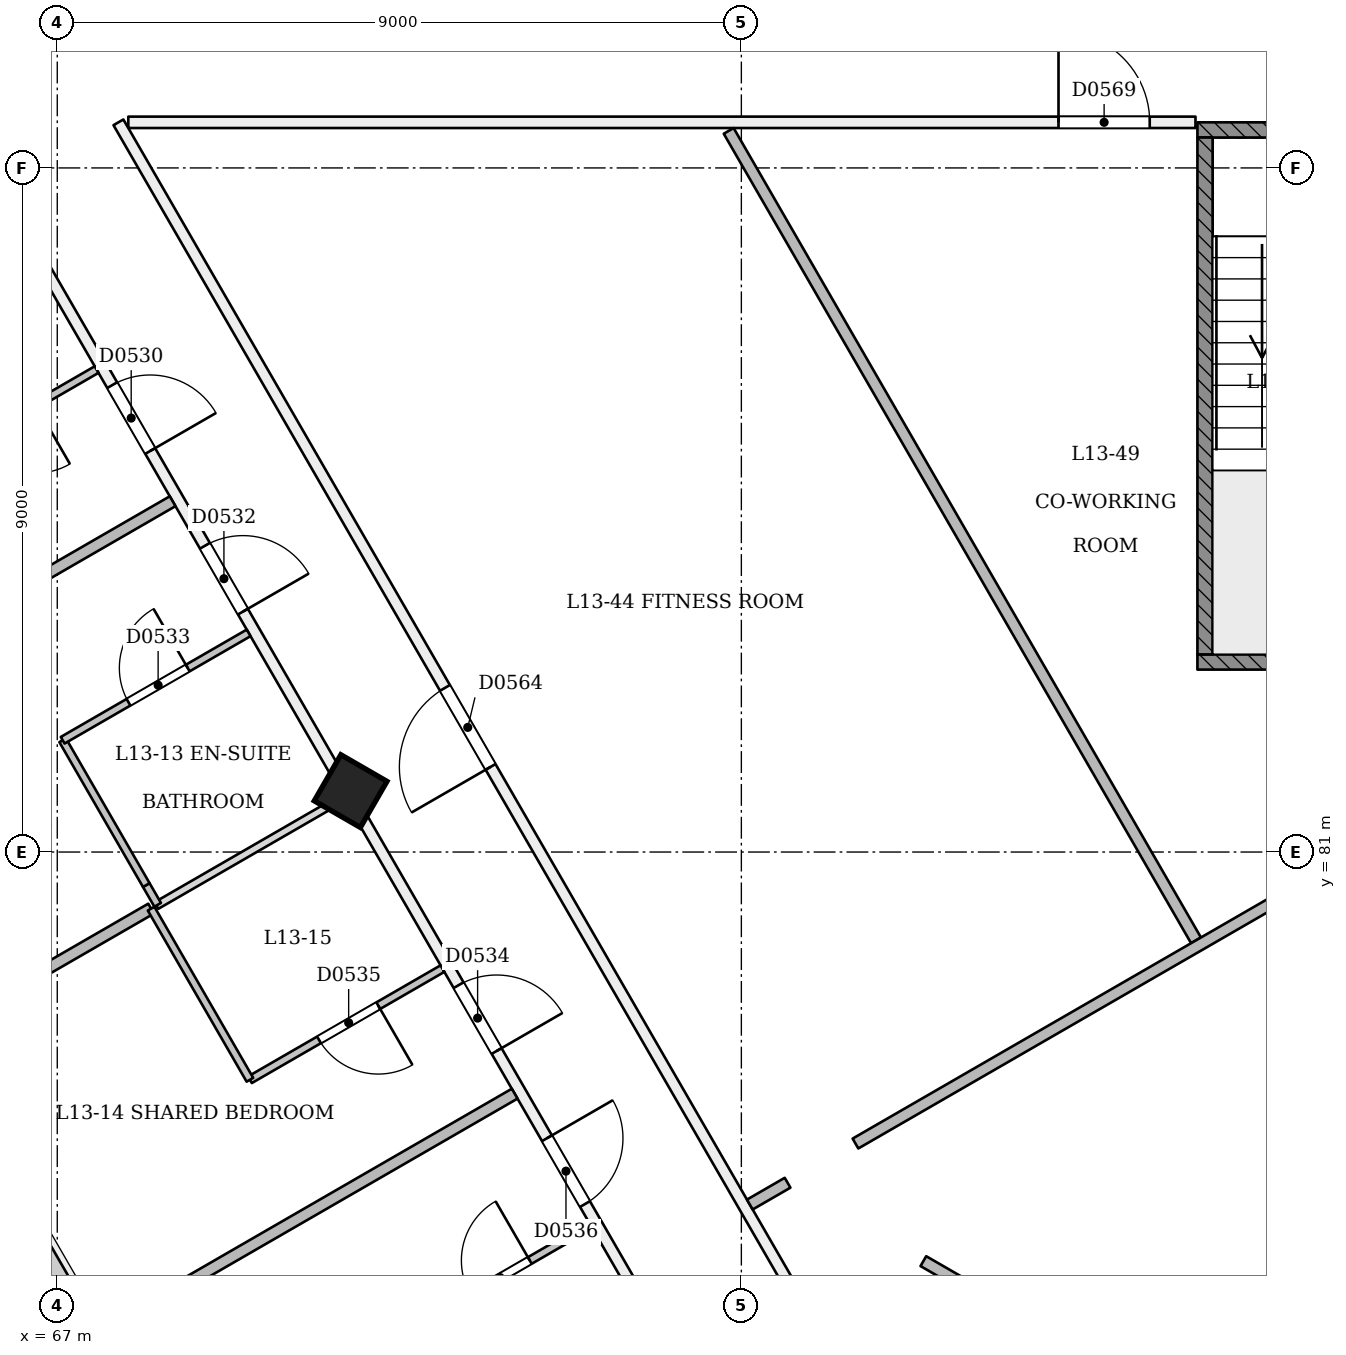
"""IFC4 building model, lengths in metres.
Left out: names, types, materials, properties, quantities, classifications, styles, units other than length and angle.
Written with IfcOpenShell. Run it as: python <this file> out.ifc"""

import sys

from ifc_helpers import new_model, si_unit, direction, frame, frame_2d, origin, origin_2d, place, context, subcontext, project, spatial, rectangle, extrude, element, fill, save


model = new_model("IFC4")
c1 = context("Model", 3, precision=1e-05, world=origin(), true_north=direction((0.0, 1.0)))
c2 = subcontext(c1, "Body", "Model", "MODEL_VIEW")
j1 = project(units=[si_unit("LENGTHUNIT", "METRE"), si_unit("PLANEANGLEUNIT", "RADIAN")], contexts=[c1])
p1 = place(None, origin())
s1 = spatial("IfcSite", under=j1, at=p1, CompositionType="ELEMENT")
p2 = place(p1, origin())
s2 = spatial("IfcBuilding", under=s1, at=p2, CompositionType="ELEMENT")
p3 = place(p2, frame((0.0, 0.0, 55.8)))
s3 = spatial("IfcBuildingStorey", under=s2, at=p3, CompositionType="ELEMENT", Elevation=55.8)
p4 = place(p3, frame((70.832, 81.755, -0.021), z_axis=(0.022222852987, 0.038483477124, 0.999012095419), x_axis=(-0.86564204084, -0.499182068467, 0.038485317347)))
e1 = element("IfcColumn", 1, at=p4, inside=s3, PredefinedType="COLUMN", context=c2, shape_type="SweptSolid", body=[
    extrude(rectangle(XDim=0.7, YDim=0.7, at=origin_2d()), origin(), (0.0, 0.0, 1.0), 3.604),
])
p5 = place(p3, frame((64.083, 93.447, 0.0), z_axis=(0.0, 0.0, 1.0), x_axis=(0.5000018851, -0.866024315419, 0.0)))
e2 = element("IfcWall", 2, at=p5, inside=s3, PredefinedType="PARTITIONING", context=c2, shape_type="SweptSolid", body=[
    extrude(rectangle(XDim=36.0, YDim=0.15, at=frame_2d((18.0, 0.0))), origin(), (0.0, 0.0, 1.0), 2.7),
])
p6 = place(p5, frame((0.605, 0.0, 0.0)))
e3 = element("IfcOpeningElement", 3, at=p6, cuts=e2, PredefinedType="OPENING", context=c2, shape_type="SweptSolid", body=[
    extrude(rectangle(XDim=1.0, YDim=2.1, at=frame_2d((0.5, 1.05))), frame((0.0, 0.085, 0.0), z_axis=(0.0, -1.0, 0.0), x_axis=(1.0, 0.0, 0.0)), (0.0, 0.0, 1.0), 0.171),
])
p7 = place(p5, frame((7.28, 0.0, 0.0)))
e4 = element("IfcOpeningElement", 4, at=p7, cuts=e2, PredefinedType="OPENING", context=c2, shape_type="SweptSolid", body=[
    extrude(rectangle(XDim=1.0, YDim=2.1, at=frame_2d((0.5, 1.05))), frame((0.0, 0.085, 0.0), z_axis=(0.0, -1.0, 0.0), x_axis=(1.0, 0.0, 0.0)), (0.0, 0.0, 1.0), 0.171),
])
p8 = place(p5, frame((9.72, 0.0, 0.0)))
e5 = element("IfcOpeningElement", 5, at=p8, cuts=e2, PredefinedType="OPENING", context=c2, shape_type="SweptSolid", body=[
    extrude(rectangle(XDim=1.0, YDim=2.1, at=frame_2d((0.5, 1.05))), frame((0.0, 0.085, 0.0), z_axis=(0.0, -1.0, 0.0), x_axis=(1.0, 0.0, 0.0)), (0.0, 0.0, 1.0), 0.171),
])
p9 = place(p5, frame((16.395, 0.0, 0.0)))
e6 = element("IfcOpeningElement", 6, at=p9, cuts=e2, PredefinedType="OPENING", context=c2, shape_type="SweptSolid", body=[
    extrude(rectangle(XDim=1.0, YDim=2.1, at=frame_2d((0.5, 1.05))), frame((0.0, 0.085, 0.0), z_axis=(0.0, -1.0, 0.0), x_axis=(1.0, 0.0, 0.0)), (0.0, 0.0, 1.0), 0.171),
])
p10 = place(p5, frame((18.72, 0.0, 0.0)))
e7 = element("IfcOpeningElement", 7, at=p10, cuts=e2, PredefinedType="OPENING", context=c2, shape_type="SweptSolid", body=[
    extrude(rectangle(XDim=1.0, YDim=2.1, at=frame_2d((0.5, 1.05))), frame((0.0, 0.085, 0.0), z_axis=(0.0, -1.0, 0.0), x_axis=(1.0, 0.0, 0.0)), (0.0, 0.0, 1.0), 0.171),
])
p11 = place(p5, frame((25.395, 0.0, 0.0)))
e8 = element("IfcOpeningElement", 8, at=p11, cuts=e2, PredefinedType="OPENING", context=c2, shape_type="SweptSolid", body=[
    extrude(rectangle(XDim=1.0, YDim=2.1, at=frame_2d((0.5, 1.05))), frame((0.0, 0.085, 0.0), z_axis=(0.0, -1.0, 0.0), x_axis=(1.0, 0.0, 0.0)), (0.0, 0.0, 1.0), 0.171),
])
p12 = place(p5, frame((27.605, 0.0, 0.0)))
e9 = element("IfcOpeningElement", 9, at=p12, cuts=e2, PredefinedType="OPENING", context=c2, shape_type="SweptSolid", body=[
    extrude(rectangle(XDim=1.0, YDim=2.1, at=frame_2d((0.5, 1.05))), frame((0.0, 0.085, 0.0), z_axis=(0.0, -1.0, 0.0), x_axis=(1.0, 0.0, 0.0)), (0.0, 0.0, 1.0), 0.171),
])
p13 = place(p5, frame((34.28, 0.0, 0.0)))
e10 = element("IfcOpeningElement", 10, at=p13, cuts=e2, PredefinedType="OPENING", context=c2, shape_type="SweptSolid", body=[
    extrude(rectangle(XDim=1.0, YDim=2.1, at=frame_2d((0.5, 1.05))), frame((0.0, 0.085, 0.0), z_axis=(0.0, -1.0, 0.0), x_axis=(1.0, 0.0, 0.0)), (0.0, 0.0, 1.0), 0.171),
])
p14 = place(p3, frame((67.935, 90.6, 0.0), z_axis=(0.0, 0.0, 1.0), x_axis=(1.0, 0.0, 0.0)))
e11 = element("IfcWall", 11, at=p14, inside=s3, PredefinedType="PARTITIONING", context=c2, shape_type="SweptSolid", body=[
    extrude(rectangle(XDim=14.04, YDim=0.15, at=frame_2d((7.02, 0.0))), origin(), (0.0, 0.0, 1.0), 3.1),
])
p15 = place(p14, frame((12.238, 0.0, 0.0)))
e12 = element("IfcOpeningElement", 12, at=p15, cuts=e11, PredefinedType="OPENING", context=c2, shape_type="SweptSolid", body=[
    extrude(rectangle(XDim=1.2, YDim=2.1, at=frame_2d((0.6, 1.05))), frame((0.0, 0.085, 0.0), z_axis=(0.0, -1.0, 0.0), x_axis=(1.0, 0.0, 0.0)), (0.0, 0.0, 1.0), 0.171),
])
p16 = place(p3, frame((85.0, 60.817, 0.0), z_axis=(0.0, 0.0, 1.0), x_axis=(-0.49999631887, 0.866027529076, 0.0)))
e13 = element("IfcWall", 13, at=p16, inside=s3, PredefinedType="PARTITIONING", context=c2, shape_type="SweptSolid", body=[
    extrude(rectangle(XDim=34.391, YDim=0.15, at=frame_2d((17.195, 0.0))), origin(), (0.0, 0.0, 1.0), 3.1),
])
p17 = place(p16, frame((24.599, 0.0, 0.0)))
e14 = element("IfcOpeningElement", 14, at=p17, cuts=e13, PredefinedType="OPENING", context=c2, shape_type="SweptSolid", body=[
    extrude(rectangle(XDim=1.2, YDim=2.1, at=frame_2d((0.6, 1.05))), frame((0.0, 0.085, 0.0), z_axis=(0.0, -1.0, 0.0), x_axis=(1.0, 0.0, 0.0)), (0.0, 0.0, 1.0), 0.171),
])
p18 = place(p16, frame((7.281, 0.0, 0.0)))
e15 = element("IfcOpeningElement", 15, at=p18, cuts=e13, PredefinedType="OPENING", context=c2, shape_type="SweptSolid", body=[
    extrude(rectangle(XDim=1.2, YDim=2.1, at=frame_2d((0.6, 1.05))), frame((0.0, 0.085, 0.0), z_axis=(0.0, -1.0, 0.0), x_axis=(1.0, 0.0, 0.0)), (0.0, 0.0, 1.0), 0.171),
])
p19 = place(p3, frame((67.518, 87.347, 0.0), z_axis=(0.0, 0.0, 1.0), x_axis=(-0.866011447264, -0.500024172624, 0.0)))
e16 = element("IfcWall", 16, at=p19, inside=s3, PredefinedType="PARTITIONING", context=c2, shape_type="SweptSolid", body=[
    extrude(rectangle(XDim=2.825, YDim=0.1, at=frame_2d((1.413, 0.0))), origin(), (0.0, 0.0, 1.0), 3.1),
])
p20 = place(p19, frame((0.925, 0.0, 0.0)))
e17 = element("IfcOpeningElement", 17, at=p20, cuts=e16, PredefinedType="OPENING", context=c2, shape_type="SweptSolid", body=[
    extrude(rectangle(XDim=0.9, YDim=2.1, at=frame_2d((0.45, 1.05))), frame((0.0, 0.061, 0.0), z_axis=(0.0, -1.0, 0.0), x_axis=(1.0, 0.0, 0.0)), (0.0, 0.0, 1.0), 0.121),
])
p21 = place(p3, frame((63.022, 82.442, 0.0), z_axis=(0.0, 0.0, 1.0), x_axis=(0.866025401434, 0.500000004071, 0.0)))
e18 = element("IfcWall", 18, at=p21, inside=s3, PredefinedType="PARTITIONING", context=c2, shape_type="SweptSolid", body=[
    extrude(rectangle(XDim=6.345, YDim=0.15, at=frame_2d((3.173, 0.0))), origin(), (0.0, 0.0, 1.0), 2.6),
])
p22 = place(p3, frame((68.321, 80.305, 0.0), z_axis=(0.0, 0.0, 1.0), x_axis=(-0.499816412211, 0.866131372301, 0.0)))
e19 = element("IfcWall", 19, at=p22, inside=s3, PredefinedType="PARTITIONING", context=c2, shape_type="SweptSolid", body=[
    extrude(rectangle(XDim=0.3, YDim=0.1, at=frame_2d((0.15, 0.0))), origin(), (0.0, 0.0, 1.0), 2.7),
])
p23 = place(p3, frame((68.171, 80.565, 0.0), z_axis=(0.0, 0.0, 1.0), x_axis=(-0.50002983664, 0.866008176907, 0.0)))
e20 = element("IfcWall", 20, at=p23, inside=s3, PredefinedType="PARTITIONING", context=c2, shape_type="SweptSolid", body=[
    extrude(rectangle(XDim=2.2, YDim=0.1, at=frame_2d((1.1, 0.0))), origin(), (0.0, 0.0, 1.0), 3.1),
])
p24 = place(p3, frame((67.071, 82.47, 0.0), z_axis=(0.0, 0.0, 1.0), x_axis=(0.866011447264, 0.500024172624, 0.0)))
e21 = element("IfcWall", 21, at=p24, inside=s3, PredefinedType="PARTITIONING", context=c2, shape_type="SweptSolid", body=[
    extrude(rectangle(XDim=2.825, YDim=0.1, at=frame_2d((1.413, 0.0))), origin(), (0.0, 0.0, 1.0), 3.1),
])
p25 = place(p24, frame((1.0, 0.0, 0.0)))
e22 = element("IfcOpeningElement", 22, at=p25, cuts=e21, PredefinedType="OPENING", context=c2, shape_type="SweptSolid", body=[
    extrude(rectangle(XDim=0.9, YDim=2.1, at=frame_2d((0.45, 1.05))), frame((0.0, 0.061, 0.0), z_axis=(0.0, -1.0, 0.0), x_axis=(1.0, 0.0, 0.0)), (0.0, 0.0, 1.0), 0.121),
])
p26 = place(p3, frame((65.29, 78.555, 0.0), z_axis=(0.0, 0.0, 1.0), x_axis=(0.866020560687, 0.500008388397, 0.0)))
e23 = element("IfcWall", 23, at=p26, inside=s3, PredefinedType="PARTITIONING", context=c2, shape_type="SweptSolid", body=[
    extrude(rectangle(XDim=3.4, YDim=0.15, at=frame_2d((1.7, 0.0))), origin(), (0.0, 0.0, 1.0), 2.6),
])
p27 = place(p3, frame((68.304, 80.295, 0.0), z_axis=(0.0, 0.0, 1.0), x_axis=(0.866011243319, 0.500024525844, 0.0)))
e24 = element("IfcWall", 24, at=p27, inside=s3, PredefinedType="PARTITIONING", context=c2, shape_type="SweptSolid", body=[
    extrude(rectangle(XDim=2.845, YDim=0.1, at=frame_2d((1.422, 0.0))), origin(), (0.0, 0.0, 1.0), 2.7),
])
p28 = place(p3, frame((72.068, 79.466, 0.0), z_axis=(0.0, 0.0, 1.0), x_axis=(-0.866046596414, -0.499963291492, 0.0)))
e25 = element("IfcWall", 25, at=p28, inside=s3, PredefinedType="PARTITIONING", context=c2, shape_type="SweptSolid", body=[
    extrude(rectangle(XDim=2.925, YDim=0.1, at=frame_2d((1.462, 0.0))), origin(), (0.0, 0.0, 1.0), 3.1),
])
p29 = place(p28, frame((0.975, 0.0, 0.0)))
e26 = element("IfcOpeningElement", 26, at=p29, cuts=e25, PredefinedType="OPENING", context=c2, shape_type="SweptSolid", body=[
    extrude(rectangle(XDim=0.9, YDim=2.1, at=frame_2d((0.45, 1.05))), frame((0.0, 0.061, 0.0), z_axis=(0.0, -1.0, 0.0), x_axis=(1.0, 0.0, 0.0)), (0.0, 0.0, 1.0), 0.121),
])
p30 = place(p3, frame((69.534, 78.004, 0.0), z_axis=(0.0, 0.0, 1.0), x_axis=(-0.500047596559, 0.865997922154, 0.0)))
e27 = element("IfcWall", 27, at=p30, inside=s3, PredefinedType="PARTITIONING", context=c2, shape_type="SweptSolid", body=[
    extrude(rectangle(XDim=2.6, YDim=0.1, at=frame_2d((1.3, 0.0))), origin(), (0.0, 0.0, 1.0), 2.7),
])
p31 = place(p3, frame((67.522, 74.648, 0.0), z_axis=(0.0, 0.0, 1.0), x_axis=(0.866025401434, 0.500000004071, 0.0)))
e28 = element("IfcWall", 28, at=p31, inside=s3, PredefinedType="PARTITIONING", context=c2, shape_type="SweptSolid", body=[
    extrude(rectangle(XDim=6.345, YDim=0.15, at=frame_2d((3.173, 0.0))), origin(), (0.0, 0.0, 1.0), 2.6),
])
p32 = place(p3, frame((71.571, 74.676, 0.0), z_axis=(0.0, 0.0, 1.0), x_axis=(0.866011447264, 0.500024172624, 0.0)))
e29 = element("IfcWall", 29, at=p32, inside=s3, PredefinedType="PARTITIONING", context=c2, shape_type="SweptSolid", body=[
    extrude(rectangle(XDim=2.825, YDim=0.1, at=frame_2d((1.413, 0.0))), origin(), (0.0, 0.0, 1.0), 3.1),
])
p33 = place(p32, frame((1.0, 0.0, 0.0)))
e30 = element("IfcOpeningElement", 30, at=p33, cuts=e29, PredefinedType="OPENING", context=c2, shape_type="SweptSolid", body=[
    extrude(rectangle(XDim=0.9, YDim=2.1, at=frame_2d((0.45, 1.05))), frame((0.0, 0.061, 0.0), z_axis=(0.0, -1.0, 0.0), x_axis=(1.0, 0.0, 0.0)), (0.0, 0.0, 1.0), 0.121),
])
p34 = place(p3, frame((78.395, 75.618, 0.0), z_axis=(0.0, 0.0, 1.0), x_axis=(0.866027097721, -0.499997066004, 0.0)))
e31 = element("IfcWall", 31, at=p34, inside=s3, PredefinedType="PARTITIONING", context=c2, shape_type="SweptSolid", body=[
    extrude(rectangle(XDim=11.441, YDim=0.15, at=frame_2d((5.72, 0.0))), origin(), (0.0, 0.0, 1.0), 3.1),
])
p35 = place(p3, frame((76.111, 76.363, 0.0), z_axis=(0.0, 0.0, 1.0), x_axis=(0.866192672213, 0.499710170603, 0.0)))
e32 = element("IfcWall", 32, at=p35, inside=s3, PredefinedType="PARTITIONING", context=c2, shape_type="SweptSolid", body=[
    extrude(rectangle(XDim=0.573, YDim=0.15, at=frame_2d((0.287, 0.0))), origin(), (0.0, 0.0, 1.0), 3.1),
])
p36 = place(p3, frame((81.982, 79.838, 0.0), z_axis=(0.0, 0.0, 1.0), x_axis=(-0.500008318019, 0.866020601321, 0.0)))
e33 = element("IfcWall", 33, at=p36, inside=s3, PredefinedType="PARTITIONING", context=c2, shape_type="SweptSolid", body=[
    extrude(rectangle(XDim=12.297, YDim=0.15, at=frame_2d((6.148, 0.0))), origin(), (0.0, 0.0, 1.0), 3.1),
])
p37 = place(p3, frame((100.529, 90.46, 0.0), z_axis=(0.0, 0.0, 1.0), x_axis=(-0.866026416576, -0.499998245789, 0.0)))
e34 = element("IfcWall", 34, at=p37, inside=s3, PredefinedType="PARTITIONING", context=c2, shape_type="SweptSolid", body=[
    extrude(rectangle(XDim=26.59, YDim=0.15, at=frame_2d((13.295, 0.0))), origin(), (0.0, 0.0, 1.0), 3.1),
])
p38 = place(p3, frame((82.0, 90.5, 0.0), z_axis=(0.0, 0.0, 1.0), x_axis=(1.0, 0.0, 0.0)))
e35 = element("IfcWall", 35, at=p38, inside=s3, PredefinedType="SOLIDWALL", context=c2, shape_type="SweptSolid", body=[
    extrude(rectangle(XDim=6.0, YDim=0.2, at=frame_2d((3.0, 0.0))), origin(), (0.0, 0.0, 1.0), 3.1),
])
p39 = place(p38, frame((0.95, 0.0, 0.0)))
e36 = element("IfcOpeningElement", 36, at=p39, cuts=e35, PredefinedType="OPENING", context=c2, shape_type="SweptSolid", body=[
    extrude(rectangle(XDim=1.2, YDim=2.1, at=frame_2d((0.6, 1.05))), frame((0.0, 0.11, 0.0), z_axis=(0.0, -1.0, 0.0), x_axis=(1.0, 0.0, 0.0)), (0.0, 0.0, 1.0), 0.221),
])
p40 = place(p38, frame((3.85, 0.0, 0.0)))
e37 = element("IfcOpeningElement", 37, at=p40, cuts=e35, PredefinedType="OPENING", context=c2, shape_type="SweptSolid", body=[
    extrude(rectangle(XDim=1.2, YDim=2.1, at=frame_2d((0.6, 1.05))), frame((0.0, 0.11, 0.0), z_axis=(0.0, -1.0, 0.0), x_axis=(1.0, 0.0, 0.0)), (0.0, 0.0, 1.0), 0.221),
])
p41 = place(p3, frame((82.0, 83.5, 0.0), z_axis=(0.0, 0.0, 1.0), x_axis=(1.0, 0.0, 0.0)))
e38 = element("IfcWall", 38, at=p41, inside=s3, PredefinedType="SOLIDWALL", context=c2, shape_type="SweptSolid", body=[
    extrude(rectangle(XDim=6.0, YDim=0.2, at=frame_2d((3.0, 0.0))), origin(), (0.0, 0.0, 1.0), 3.1),
])
p42 = place(p3, frame((82.1, 83.6, 0.0), z_axis=(0.0, 0.0, 1.0), x_axis=(0.0, 1.0, 0.0)))
e39 = element("IfcWall", 39, at=p42, inside=s3, PredefinedType="SOLIDWALL", context=c2, shape_type="SweptSolid", body=[
    extrude(rectangle(XDim=6.8, YDim=0.2, at=frame_2d((3.4, 0.0))), origin(), (0.0, 0.0, 1.0), 3.1),
])
p43 = place(p7, origin())
e40 = element("IfcDoor", 40, at=p43, inside=s3, OperationType="SINGLE_SWING_RIGHT", PredefinedType="NOTDEFINED", context=c2, shape_type="SweptSolid", body=[
    extrude(rectangle(XDim=1.0, YDim=2.1, at=frame_2d((0.5, 1.05))), frame((0.0, 0.025, 0.0), z_axis=(0.0, -1.0, 0.0), x_axis=(1.0, 0.0, 0.0)), (0.0, 0.0, 1.0), 0.05),
])
fill(e4, e40)
p44 = place(p8, origin())
e41 = element("IfcDoor", 41, at=p44, inside=s3, OperationType="SINGLE_SWING_RIGHT", PredefinedType="NOTDEFINED", context=c2, shape_type="SweptSolid", body=[
    extrude(rectangle(XDim=1.0, YDim=2.1, at=frame_2d((0.5, 1.05))), frame((0.0, 0.025, 0.0), z_axis=(0.0, -1.0, 0.0), x_axis=(1.0, 0.0, 0.0)), (0.0, 0.0, 1.0), 0.05),
])
fill(e5, e41)
p45 = place(p25, origin())
e42 = element("IfcDoor", 42, at=p45, inside=s3, OperationType="SINGLE_SWING_RIGHT", PredefinedType="NOTDEFINED", context=c2, shape_type="SweptSolid", body=[
    extrude(rectangle(XDim=0.9, YDim=2.1, at=frame_2d((0.45, 1.05))), frame((0.0, 0.025, 0.0), z_axis=(0.0, -1.0, 0.0), x_axis=(1.0, 0.0, 0.0)), (0.0, 0.0, 1.0), 0.05),
])
fill(e22, e42)
p46 = place(p9, origin())
e43 = element("IfcDoor", 43, at=p46, inside=s3, OperationType="SINGLE_SWING_RIGHT", PredefinedType="NOTDEFINED", context=c2, shape_type="SweptSolid", body=[
    extrude(rectangle(XDim=1.0, YDim=2.1, at=frame_2d((0.5, 1.05))), frame((0.0, 0.025, 0.0), z_axis=(0.0, -1.0, 0.0), x_axis=(1.0, 0.0, 0.0)), (0.0, 0.0, 1.0), 0.05),
])
fill(e6, e43)
p47 = place(p29, origin())
e44 = element("IfcDoor", 44, at=p47, inside=s3, OperationType="SINGLE_SWING_LEFT", PredefinedType="NOTDEFINED", context=c2, shape_type="SweptSolid", body=[
    extrude(rectangle(XDim=0.9, YDim=2.1, at=frame_2d((0.45, 1.05))), frame((0.0, 0.025, 0.0), z_axis=(0.0, -1.0, 0.0), x_axis=(1.0, 0.0, 0.0)), (0.0, 0.0, 1.0), 0.05),
])
fill(e26, e44)
p48 = place(p10, origin())
e45 = element("IfcDoor", 45, at=p48, inside=s3, OperationType="SINGLE_SWING_LEFT", PredefinedType="NOTDEFINED", context=c2, shape_type="SweptSolid", body=[
    extrude(rectangle(XDim=1.0, YDim=2.1, at=frame_2d((0.5, 1.05))), frame((0.0, 0.025, 0.0), z_axis=(0.0, -1.0, 0.0), x_axis=(1.0, 0.0, 0.0)), (0.0, 0.0, 1.0), 0.05),
])
fill(e7, e45)
p49 = place(p33, origin())
e46 = element("IfcDoor", 46, at=p49, inside=s3, OperationType="SINGLE_SWING_RIGHT", PredefinedType="NOTDEFINED", context=c2, shape_type="SweptSolid", body=[
    extrude(rectangle(XDim=0.9, YDim=2.1, at=frame_2d((0.45, 1.05))), frame((0.0, 0.025, 0.0), z_axis=(0.0, -1.0, 0.0), x_axis=(1.0, 0.0, 0.0)), (0.0, 0.0, 1.0), 0.05),
])
fill(e30, e46)
p50 = place(p17, origin())
e47 = element("IfcDoor", 47, at=p50, inside=s3, OperationType="SINGLE_SWING_LEFT", PredefinedType="NOTDEFINED", context=c2, shape_type="SweptSolid", body=[
    extrude(rectangle(XDim=1.2, YDim=2.1, at=frame_2d((0.6, 1.05))), frame((0.0, 0.025, 0.0), z_axis=(0.0, -1.0, 0.0), x_axis=(1.0, 0.0, 0.0)), (0.0, 0.0, 1.0), 0.05),
])
fill(e14, e47)
p51 = place(p15, origin())
e48 = element("IfcDoor", 48, at=p51, inside=s3, OperationType="SINGLE_SWING_LEFT", PredefinedType="NOTDEFINED", context=c2, shape_type="SweptSolid", body=[
    extrude(rectangle(XDim=1.2, YDim=2.1, at=frame_2d((0.6, 1.05))), frame((0.0, 0.025, 0.0), z_axis=(0.0, -1.0, 0.0), x_axis=(1.0, 0.0, 0.0)), (0.0, 0.0, 1.0), 0.05),
])
fill(e12, e48)
save(model, sys.argv[1])
